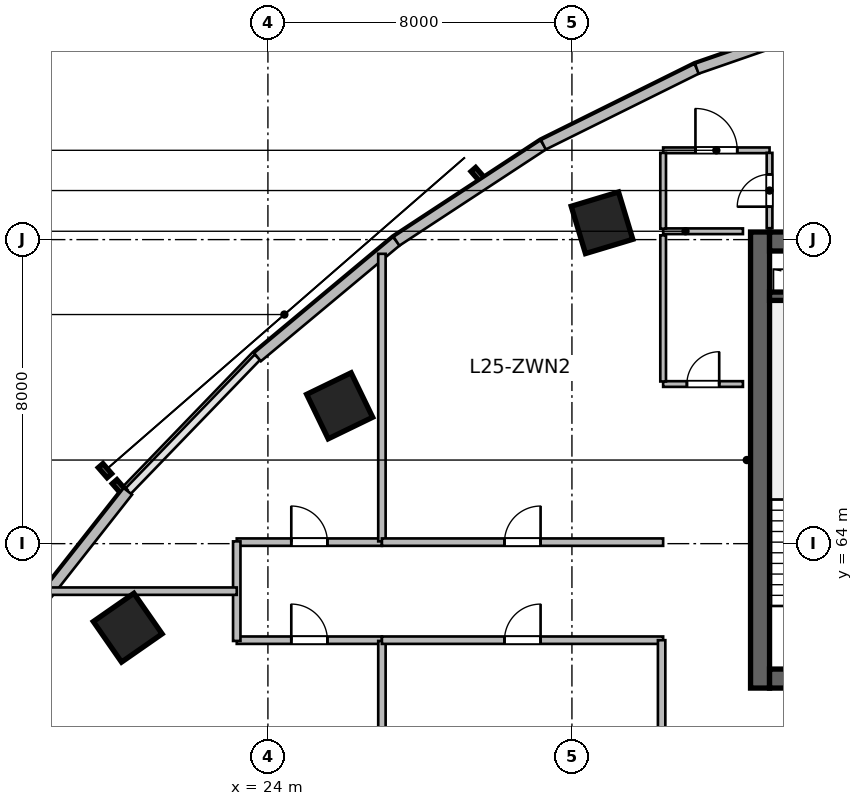
"""IFC4 building model, lengths in metres.
Left out: names, types, materials, properties, quantities, classifications, styles, units other than length and angle.
Written with IfcOpenShell. Run it as: python <this file> out.ifc"""

import sys

from ifc_helpers import new_model, si_unit, direction, frame, frame_2d, origin, origin_2d, place, context, subcontext, project, spatial, rectangle, extrude, source, transform, mapped, element, fill, save


model = new_model("IFC4")
c1 = context("Model", 3, precision=1e-05, world=origin(), true_north=direction((0.0, 1.0)))
c2 = subcontext(c1, "Body", "Model", "MODEL_VIEW")
j1 = project(units=[si_unit("LENGTHUNIT", "METRE"), si_unit("PLANEANGLEUNIT", "RADIAN")], contexts=[c1])
p1 = place(None, origin())
s1 = spatial("IfcSite", under=j1, at=p1, CompositionType="ELEMENT")
p2 = place(p1, origin())
s2 = spatial("IfcBuilding", under=s1, at=p2, CompositionType="ELEMENT")
p3 = place(p2, frame((0.0, 0.0, 107.7)))
s3 = spatial("IfcBuildingStorey", under=s2, at=p3, CompositionType="ELEMENT", Elevation=107.7)
m1 = source(origin(), c2, "Body", "SweptSolid", [
    extrude(rectangle(XDim=12.0, YDim=0.5, at=frame_2d((6.0, 0.0))), origin(), (0.0, 0.0, 1.0), 3.9),
])
p4 = place(p3, frame((36.95, 60.2, 0.0), z_axis=(0.0, 0.0, 1.0), x_axis=(0.0, 1.0, 0.0)))
e1 = element("IfcWall", 1, at=p4, inside=s3, PredefinedType="SHEAR", context=c2, shape_type="MappedRepresentation", body=[
    mapped(m1, transform((0.0, 0.0, 0.0), scale=1.0)),
])
m2 = source(origin(), c2, "Body", "SweptSolid", [
    extrude(rectangle(XDim=21.6, YDim=0.5, at=frame_2d((10.8, 0.0))), origin(), (0.0, 0.0, 1.0), 3.9),
])
p5 = place(p3, frame((37.2, 60.45, 0.0), z_axis=(0.0, 0.0, 1.0), x_axis=(1.0, 0.0, 0.0)))
e2 = element("IfcWall", 2, at=p5, inside=s3, PredefinedType="SHEAR", context=c2, shape_type="MappedRepresentation", body=[
    mapped(m2, transform((0.0, 0.0, 0.0), scale=1.0)),
])
p6 = place(p5, frame((1.1, 0.0, 0.0)))
e3 = element("IfcOpeningElement", 3, at=p6, cuts=e2, PredefinedType="OPENING", context=c2, shape_type="SweptSolid", body=[
    extrude(rectangle(XDim=1.15, YDim=2.15, at=frame_2d((0.575, 1.075))), frame((0.0, 0.26, 0.0), z_axis=(0.0, -1.0, 0.0), x_axis=(1.0, 0.0, 0.0)), (0.0, 0.0, 1.0), 0.52),
])
p7 = place(p5, frame((19.5, 0.0, 0.0)))
e4 = element("IfcOpeningElement", 4, at=p7, cuts=e2, PredefinedType="OPENING", context=c2, shape_type="SweptSolid", body=[
    extrude(rectangle(XDim=0.9, YDim=2.1, at=frame_2d((0.45, 1.05))), frame((0.0, 0.26, 0.0), z_axis=(0.0, -1.0, 0.0), x_axis=(1.0, 0.0, 0.0)), (0.0, 0.0, 1.0), 0.52),
])
p8 = place(p5, frame((12.02, 0.0, 0.0)))
e5 = element("IfcOpeningElement", 5, at=p8, cuts=e2, PredefinedType="OPENING", context=c2, shape_type="SweptSolid", body=[
    extrude(rectangle(XDim=1.6, YDim=2.15, at=frame_2d((0.8, 1.075))), frame((0.0, 0.26, 0.0), z_axis=(0.0, -1.0, 0.0), x_axis=(1.0, 0.0, 0.0)), (0.0, 0.0, 1.0), 0.52),
])
p9 = place(p3, frame((37.2, 71.95, 0.0), z_axis=(0.0, 0.0, 1.0), x_axis=(1.0, 0.0, 0.0)))
e6 = element("IfcWall", 6, at=p9, inside=s3, PredefinedType="SHEAR", context=c2, shape_type="MappedRepresentation", body=[
    mapped(m2, transform((0.0, 0.0, 0.0), scale=1.0)),
])
p10 = place(p9, frame((1.2, 0.0, 0.0)))
e7 = element("IfcOpeningElement", 7, at=p10, cuts=e6, PredefinedType="OPENING", context=c2, shape_type="SweptSolid", body=[
    extrude(rectangle(XDim=0.9, YDim=2.1, at=frame_2d((0.45, 1.05))), frame((0.0, 0.26, 0.0), z_axis=(0.0, -1.0, 0.0), x_axis=(1.0, 0.0, 0.0)), (0.0, 0.0, 1.0), 0.52),
])
p11 = place(p9, frame((14.7, 0.0, 0.0)))
e8 = element("IfcOpeningElement", 8, at=p11, cuts=e6, PredefinedType="OPENING", context=c2, shape_type="SweptSolid", body=[
    extrude(rectangle(XDim=1.2, YDim=2.15, at=frame_2d((0.6, 1.075))), frame((0.0, 0.26, 0.0), z_axis=(0.0, -1.0, 0.0), x_axis=(1.0, 0.0, 0.0)), (0.0, 0.0, 1.0), 0.52),
])
p12 = place(p9, frame((4.15, 0.0, 0.0)))
e9 = element("IfcOpeningElement", 9, at=p12, cuts=e6, PredefinedType="OPENING", context=c2, shape_type="SweptSolid", body=[
    extrude(rectangle(XDim=1.3, YDim=2.15, at=frame_2d((0.65, 1.075))), frame((0.0, 0.26, 0.0), z_axis=(0.0, -1.0, 0.0), x_axis=(1.0, 0.0, 0.0)), (0.0, 0.0, 1.0), 0.52),
])
p13 = place(p9, frame((7.25, 0.0, 0.0)))
e10 = element("IfcOpeningElement", 10, at=p13, cuts=e6, PredefinedType="OPENING", context=c2, shape_type="SweptSolid", body=[
    extrude(rectangle(XDim=0.9, YDim=2.1, at=frame_2d((0.45, 1.05))), frame((0.0, 0.26, 0.0), z_axis=(0.0, -1.0, 0.0), x_axis=(1.0, 0.0, 0.0)), (0.0, 0.0, 1.0), 0.52),
])
p14 = place(p9, frame((10.95, 0.0, 0.0)))
e11 = element("IfcOpeningElement", 11, at=p14, cuts=e6, PredefinedType="OPENING", context=c2, shape_type="SweptSolid", body=[
    extrude(rectangle(XDim=0.9, YDim=2.1, at=frame_2d((0.45, 1.05))), frame((0.0, 0.26, 0.0), z_axis=(0.0, -1.0, 0.0), x_axis=(1.0, 0.0, 0.0)), (0.0, 0.0, 1.0), 0.52),
])
m3 = source(origin(), c2, "Body", "SweptSolid", [
    extrude(rectangle(XDim=3.27, YDim=0.22, at=frame_2d((1.635, 0.0))), origin(), (0.0, 0.0, 1.0), 3.9),
])
p15 = place(p3, frame((37.2, 70.51, 0.0), z_axis=(0.0, 0.0, 1.0), x_axis=(1.0, 0.0, 0.0)))
e12 = element("IfcWall", 12, at=p15, inside=s3, PredefinedType="SHEAR", context=c2, shape_type="MappedRepresentation", body=[
    mapped(m3, transform((0.0, 0.0, 0.0), scale=1.0)),
])
m4 = source(origin(), c2, "Body", "SweptSolid", [
    extrude(rectangle(XDim=1.3, YDim=1.3, at=origin_2d()), origin(), (0.0, 0.0, 1.0), 3.9),
])
for number, where, z_axis, x_axis in (
    (13, (20.311, 61.789, 0.0), (0.0, 0.0, 1.0), (-0.571, 0.821, 0.0)),
    (14, (25.888, 67.627, 0.0), (0.0, 0.0, 1.0), (-0.436, 0.9, 0.0)),
    (15, (32.791, 72.442, 0.0), (0.0, 0.0, 1.0), (-0.289, 0.957, 0.0)),
):
    element("IfcColumn", number, at=place(p3, frame(where, z_axis=z_axis, x_axis=x_axis)), inside=s3, PredefinedType="COLUMN", context=c2, shape_type="MappedRepresentation", body=[
        mapped(m4, transform((0.0, 0.0, 0.0), scale=1.0)),
    ])
m5 = source(origin(), c2, "Body", "SweptSolid", [
    extrude(rectangle(XDim=5.058, YDim=0.28, at=frame_2d((2.529, 0.0))), origin(), (0.0, 0.0, 1.0), 3.65),
])
p16 = place(p3, frame((17.188, 61.4, 0.0), z_axis=(0.0, 0.0, 1.0), x_axis=(0.618145507434, 0.786063694391, 0.0)))
e16 = element("IfcWall", 16, at=p16, inside=s3, PredefinedType="SOLIDWALL", context=c2, shape_type="MappedRepresentation", body=[
    mapped(m5, transform((0.0, 0.0, 0.0), scale=1.0)),
])
m6 = source(origin(), c2, "Body", "SweptSolid", [
    extrude(rectangle(XDim=4.762, YDim=0.28, at=frame_2d((2.381, 0.0))), origin(), (0.0, 0.0, 1.0), 3.65),
])
p17 = place(p3, frame((23.725, 68.907, 0.0), z_axis=(0.0, 0.0, 1.0), x_axis=(0.767952279762, 0.640507061638, 0.0)))
e17 = element("IfcWall", 17, at=p17, inside=s3, PredefinedType="SOLIDWALL", context=c2, shape_type="MappedRepresentation", body=[
    mapped(m6, transform((0.0, 0.0, 0.0), scale=1.0)),
])
m7 = source(origin(), c2, "Body", "SweptSolid", [
    extrude(rectangle(XDim=4.626, YDim=0.28, at=frame_2d((2.313, 0.0))), origin(), (0.0, 0.0, 1.0), 3.65),
])
p18 = place(p3, frame((27.382, 71.958, 0.0), z_axis=(0.0, 0.0, 1.0), x_axis=(0.83595938331, 0.548791316855, 0.0)))
e18 = element("IfcWall", 18, at=p18, inside=s3, PredefinedType="SOLIDWALL", context=c2, shape_type="MappedRepresentation", body=[
    mapped(m7, transform((0.0, 0.0, 0.0), scale=1.0)),
])
m8 = source(origin(), c2, "Body", "SweptSolid", [
    extrude(rectangle(XDim=4.506, YDim=0.28, at=frame_2d((2.253, 0.0))), origin(), (0.0, 0.0, 1.0), 3.65),
])
p19 = place(p3, frame((31.249, 74.496, 0.0), z_axis=(0.0, 0.0, 1.0), x_axis=(0.89597155075, 0.444111450254, 0.0)))
e19 = element("IfcWall", 19, at=p19, inside=s3, PredefinedType="SOLIDWALL", context=c2, shape_type="MappedRepresentation", body=[
    mapped(m8, transform((0.0, 0.0, 0.0), scale=1.0)),
])
m9 = source(origin(), c2, "Body", "SweptSolid", [
    extrude(rectangle(XDim=4.409, YDim=0.28, at=frame_2d((2.205, 0.0))), origin(), (0.0, 0.0, 1.0), 3.65),
])
p20 = place(p3, frame((35.286, 76.497, 0.0), z_axis=(0.0, 0.0, 1.0), x_axis=(0.944879374121, 0.327418643881, 0.0)))
e20 = element("IfcWall", 20, at=p20, inside=s3, PredefinedType="SOLIDWALL", context=c2, shape_type="MappedRepresentation", body=[
    mapped(m9, transform((0.0, 0.0, 0.0), scale=1.0)),
])
m10 = source(origin(), c2, "Body", "SweptSolid", [
    extrude(rectangle(XDim=2.1, YDim=0.15, at=frame_2d((1.05, 0.0))), origin(), (0.0, 0.0, 1.0), 3.65),
])
p21 = place(p3, frame((34.4, 72.22, 0.0), z_axis=(0.0, 0.0, 1.0), x_axis=(1.0, 0.0, 0.0)))
e21 = element("IfcWall", 21, at=p21, inside=s3, PredefinedType="PARTITIONING", context=c2, shape_type="MappedRepresentation", body=[
    mapped(m10, transform((0.0, 0.0, 0.0), scale=1.0)),
])
m11 = source(origin(), c2, "Body", "SweptSolid", [
    extrude(rectangle(XDim=2.8, YDim=0.15, at=frame_2d((1.4, 0.0))), origin(), (0.0, 0.0, 1.0), 3.65),
])
p22 = place(p3, frame((34.4, 74.35, 0.0), z_axis=(0.0, 0.0, 1.0), x_axis=(1.0, 0.0, 0.0)))
e22 = element("IfcWall", 22, at=p22, inside=s3, PredefinedType="PARTITIONING", context=c2, shape_type="MappedRepresentation", body=[
    mapped(m11, transform((0.0, 0.0, 0.0), scale=1.0)),
])
p23 = place(p22, frame((0.85, 0.0, 0.0)))
e23 = element("IfcOpeningElement", 23, at=p23, cuts=e22, PredefinedType="OPENING", context=c2, shape_type="SweptSolid", body=[
    extrude(rectangle(XDim=1.1, YDim=2.15, at=frame_2d((0.55, 1.075))), frame((0.0, 0.085, 0.0), z_axis=(0.0, -1.0, 0.0), x_axis=(1.0, 0.0, 0.0)), (0.0, 0.0, 1.0), 0.17),
])
m12 = source(origin(), c2, "Body", "SweptSolid", [
    extrude(rectangle(XDim=1.995, YDim=0.15, at=frame_2d((0.998, 0.0))), origin(), (0.0, 0.0, 1.0), 3.65),
])
p24 = place(p3, frame((34.4, 72.288, 0.0), z_axis=(0.0, 0.0, 1.0), x_axis=(0.0, 1.0, 0.0)))
e24 = element("IfcWall", 24, at=p24, inside=s3, PredefinedType="PARTITIONING", context=c2, shape_type="MappedRepresentation", body=[
    mapped(m12, transform((0.0, 0.0, 0.0), scale=1.0)),
])
m13 = source(origin(), c2, "Body", "SweptSolid", [
    extrude(rectangle(XDim=1.982, YDim=0.15, at=frame_2d((0.991, 0.0))), origin(), (0.0, 0.0, 1.0), 3.65),
])
p25 = place(p3, frame((37.2, 72.3, 0.0), z_axis=(0.0, 0.0, 1.0), x_axis=(0.0, 1.0, 0.0)))
e25 = element("IfcWall", 25, at=p25, inside=s3, PredefinedType="PARTITIONING", context=c2, shape_type="MappedRepresentation", body=[
    mapped(m13, transform((0.0, 0.0, 0.0), scale=1.0)),
])
p26 = place(p25, frame((0.566, 0.0, 0.0)))
e26 = element("IfcOpeningElement", 26, at=p26, cuts=e25, PredefinedType="OPENING", context=c2, shape_type="SweptSolid", body=[
    extrude(rectangle(XDim=0.85, YDim=2.1, at=frame_2d((0.425, 1.05))), frame((0.0, 0.085, 0.0), z_axis=(0.0, -1.0, 0.0), x_axis=(1.0, 0.0, 0.0)), (0.0, 0.0, 1.0), 0.17),
])
p27 = place(p3, frame((34.4, 68.2, 0.0), z_axis=(0.0, 0.0, 1.0), x_axis=(1.0, 0.0, 0.0)))
e27 = element("IfcWall", 27, at=p27, inside=s3, PredefinedType="PARTITIONING", context=c2, shape_type="MappedRepresentation", body=[
    mapped(m10, transform((0.0, 0.0, 0.0), scale=1.0)),
])
p28 = place(p27, frame((0.625, 0.0, 0.0)))
e28 = element("IfcOpeningElement", 28, at=p28, cuts=e27, PredefinedType="OPENING", context=c2, shape_type="SweptSolid", body=[
    extrude(rectangle(XDim=0.85, YDim=2.1, at=frame_2d((0.425, 1.05))), frame((0.0, 0.085, 0.0), z_axis=(0.0, -1.0, 0.0), x_axis=(1.0, 0.0, 0.0)), (0.0, 0.0, 1.0), 0.17),
])
m14 = source(origin(), c2, "Body", "SweptSolid", [
    extrude(rectangle(XDim=3.845, YDim=0.15, at=frame_2d((1.922, 0.0))), origin(), (0.0, 0.0, 1.0), 3.65),
])
p29 = place(p3, frame((34.4, 68.268, 0.0), z_axis=(0.0, 0.0, 1.0), x_axis=(0.0, 1.0, 0.0)))
e29 = element("IfcWall", 29, at=p29, inside=s3, PredefinedType="PARTITIONING", context=c2, shape_type="MappedRepresentation", body=[
    mapped(m14, transform((0.0, 0.0, 0.0), scale=1.0)),
])
m15 = source(origin(), c2, "Body", "SweptSolid", [
    extrude(rectangle(XDim=3.82, YDim=0.195, at=frame_2d((1.91, 0.0))), origin(), (0.0, 0.0, 1.0), 3.65),
])
p30 = place(p3, frame((23.18, 64.04, 0.0), z_axis=(0.0, 0.0, 1.0), x_axis=(1.0, 0.0, 0.0)))
e30 = element("IfcWall", 30, at=p30, inside=s3, PredefinedType="PARTITIONING", context=c2, shape_type="MappedRepresentation", body=[
    mapped(m15, transform((0.0, 0.0, 0.0), scale=1.0)),
])
p31 = place(p30, frame((1.435, 0.0, 0.0)))
e31 = element("IfcOpeningElement", 31, at=p31, cuts=e30, PredefinedType="OPENING", context=c2, shape_type="SweptSolid", body=[
    extrude(rectangle(XDim=0.95, YDim=2.1, at=frame_2d((0.475, 1.05))), frame((0.0, 0.107, 0.0), z_axis=(0.0, -1.0, 0.0), x_axis=(1.0, 0.0, 0.0)), (0.0, 0.0, 1.0), 0.215),
])
m16 = source(origin(), c2, "Body", "SweptSolid", [
    extrude(rectangle(XDim=7.566, YDim=0.195, at=frame_2d((3.783, 0.0))), origin(), (0.0, 0.0, 1.0), 2.942),
])
p32 = place(p3, frame((27.0, 64.06, 0.0), z_axis=(0.0, 0.0, 1.0), x_axis=(0.0, 1.0, 0.0)))
e32 = element("IfcWall", 32, at=p32, inside=s3, PredefinedType="PARTITIONING", context=c2, shape_type="MappedRepresentation", body=[
    mapped(m16, transform((0.0, 0.0, 0.0), scale=1.0)),
])
m17 = source(origin(), c2, "Body", "SweptSolid", [
    extrude(rectangle(XDim=7.4, YDim=0.195, at=frame_2d((3.7, 0.0))), origin(), (0.0, 0.0, 1.0), 3.65),
])
p33 = place(p3, frame((27.0, 64.04, 0.0), z_axis=(0.0, 0.0, 1.0), x_axis=(1.0, 0.0, 0.0)))
e33 = element("IfcWall", 33, at=p33, inside=s3, PredefinedType="PARTITIONING", context=c2, shape_type="MappedRepresentation", body=[
    mapped(m17, transform((0.0, 0.0, 0.0), scale=1.0)),
])
p34 = place(p33, frame((3.225, 0.0, 0.0)))
e34 = element("IfcOpeningElement", 34, at=p34, cuts=e33, PredefinedType="OPENING", context=c2, shape_type="SweptSolid", body=[
    extrude(rectangle(XDim=0.95, YDim=2.1, at=frame_2d((0.475, 1.05))), frame((0.0, 0.107, 0.0), z_axis=(0.0, -1.0, 0.0), x_axis=(1.0, 0.0, 0.0)), (0.0, 0.0, 1.0), 0.215),
])
p35 = place(p3, frame((23.18, 61.46, 0.0), z_axis=(0.0, 0.0, 1.0), x_axis=(1.0, 0.0, 0.0)))
e35 = element("IfcWall", 35, at=p35, inside=s3, PredefinedType="PARTITIONING", context=c2, shape_type="MappedRepresentation", body=[
    mapped(m15, transform((0.0, 0.0, 0.0), scale=1.0)),
])
p36 = place(p35, frame((1.435, 0.0, 0.0)))
e36 = element("IfcOpeningElement", 36, at=p36, cuts=e35, PredefinedType="OPENING", context=c2, shape_type="SweptSolid", body=[
    extrude(rectangle(XDim=0.95, YDim=2.1, at=frame_2d((0.475, 1.05))), frame((0.0, 0.107, 0.0), z_axis=(0.0, -1.0, 0.0), x_axis=(1.0, 0.0, 0.0)), (0.0, 0.0, 1.0), 0.215),
])
m18 = source(origin(), c2, "Body", "SweptSolid", [
    extrude(rectangle(XDim=23.771, YDim=0.195, at=frame_2d((11.886, 0.0))), origin(), (0.0, 0.0, 1.0), 2.942),
])
p37 = place(p3, frame((27.0, 37.668, 0.0), z_axis=(0.0, 0.0, 1.0), x_axis=(0.0, 1.0, 0.0)))
e37 = element("IfcWall", 37, at=p37, inside=s3, PredefinedType="PARTITIONING", context=c2, shape_type="MappedRepresentation", body=[
    mapped(m18, transform((0.0, 0.0, 0.0), scale=1.0)),
])
p38 = place(p3, frame((27.0, 61.46, 0.0), z_axis=(0.0, 0.0, 1.0), x_axis=(1.0, 0.0, 0.0)))
e38 = element("IfcWall", 38, at=p38, inside=s3, PredefinedType="PARTITIONING", context=c2, shape_type="MappedRepresentation", body=[
    mapped(m17, transform((0.0, 0.0, 0.0), scale=1.0)),
])
p39 = place(p38, frame((3.225, 0.0, 0.0)))
e39 = element("IfcOpeningElement", 39, at=p39, cuts=e38, PredefinedType="OPENING", context=c2, shape_type="SweptSolid", body=[
    extrude(rectangle(XDim=0.95, YDim=2.1, at=frame_2d((0.475, 1.05))), frame((0.0, 0.107, 0.0), z_axis=(0.0, -1.0, 0.0), x_axis=(1.0, 0.0, 0.0)), (0.0, 0.0, 1.0), 0.215),
])
m19 = source(origin(), c2, "Body", "SweptSolid", [
    extrude(rectangle(XDim=13.988, YDim=0.195, at=frame_2d((6.994, 0.0))), origin(), (0.0, 0.0, 1.0), 3.65),
])
p40 = place(p3, frame((34.36, 47.472, 0.0), z_axis=(0.0, 0.0, 1.0), x_axis=(0.0, 1.0, 0.0)))
e40 = element("IfcWall", 40, at=p40, inside=s3, PredefinedType="PARTITIONING", context=c2, shape_type="MappedRepresentation", body=[
    mapped(m19, transform((0.0, 0.0, 0.0), scale=1.0)),
])
m20 = source(origin(), c2, "Body", "SweptSolid", [
    extrude(rectangle(XDim=2.62, YDim=0.195, at=frame_2d((1.31, 0.0))), origin(), (0.0, 0.0, 1.0), 3.65),
])
p41 = place(p3, frame((23.18, 61.44, 0.0), z_axis=(0.0, 0.0, 1.0), x_axis=(0.0, 1.0, 0.0)))
e41 = element("IfcWall", 41, at=p41, inside=s3, PredefinedType="PARTITIONING", context=c2, shape_type="MappedRepresentation", body=[
    mapped(m20, transform((0.0, 0.0, 0.0), scale=1.0)),
])
m21 = source(origin(), c2, "Body", "SweptSolid", [
    extrude(rectangle(XDim=4.917, YDim=0.195, at=frame_2d((2.459, 0.0))), origin(), (0.0, 0.0, 1.0), 3.65),
])
p42 = place(p3, frame((18.262, 62.75, 0.0), z_axis=(0.0, 0.0, 1.0), x_axis=(1.0, 0.0, 0.0)))
e42 = element("IfcWall", 42, at=p42, inside=s3, PredefinedType="PARTITIONING", context=c2, shape_type="MappedRepresentation", body=[
    mapped(m21, transform((0.0, 0.0, 0.0), scale=1.0)),
])
m22 = source(origin(), c2, "Body", "SweptSolid", [
    extrude(rectangle(XDim=0.85, YDim=2.1, at=frame_2d((0.425, 1.05))), frame((0.0, 0.025, 0.0), z_axis=(0.0, -1.0, 0.0), x_axis=(1.0, 0.0, 0.0)), (0.0, 0.0, 1.0), 0.05),
])
p43 = place(p26, origin())
e43 = element("IfcDoor", 43, at=p43, inside=s3, OperationType="SINGLE_SWING_LEFT", PredefinedType="DOOR", context=c2, shape_type="MappedRepresentation", body=[
    mapped(m22, transform((0.0, 0.0, 0.0), scale=1.0)),
])
fill(e26, e43)
p44 = place(p28, origin())
e44 = element("IfcDoor", 44, at=p44, inside=s3, OperationType="SINGLE_SWING_RIGHT", PredefinedType="DOOR", context=c2, shape_type="MappedRepresentation", body=[
    mapped(m22, transform((0.0, 0.0, 0.0), scale=1.0)),
])
fill(e28, e44)
m23 = source(origin(), c2, "Body", "SweptSolid", [
    extrude(rectangle(XDim=1.1, YDim=2.15, at=frame_2d((0.55, 1.075))), frame((0.0, 0.025, 0.0), z_axis=(0.0, -1.0, 0.0), x_axis=(1.0, 0.0, 0.0)), (0.0, 0.0, 1.0), 0.05),
])
p45 = place(p23, origin())
e45 = element("IfcDoor", 45, at=p45, inside=s3, OperationType="SINGLE_SWING_LEFT", PredefinedType="DOOR", context=c2, shape_type="MappedRepresentation", body=[
    mapped(m23, transform((0.0, 0.0, 0.0), scale=1.0)),
])
fill(e23, e45)
m24 = source(origin(), c2, "Body", "SweptSolid", [
    extrude(rectangle(XDim=0.95, YDim=2.1, at=frame_2d((0.475, 1.05))), frame((0.0, 0.025, 0.0), z_axis=(0.0, -1.0, 0.0), x_axis=(1.0, 0.0, 0.0)), (0.0, 0.0, 1.0), 0.05),
])
p46 = place(p31, origin())
e46 = element("IfcDoor", 46, at=p46, inside=s3, OperationType="SINGLE_SWING_LEFT", PredefinedType="DOOR", context=c2, shape_type="MappedRepresentation", body=[
    mapped(m24, transform((0.0, 0.0, 0.0), scale=1.0)),
])
fill(e31, e46)
p47 = place(p34, origin())
e47 = element("IfcDoor", 47, at=p47, inside=s3, OperationType="SINGLE_SWING_RIGHT", PredefinedType="DOOR", context=c2, shape_type="MappedRepresentation", body=[
    mapped(m24, transform((0.0, 0.0, 0.0), scale=1.0)),
])
fill(e34, e47)
p48 = place(p36, origin())
e48 = element("IfcDoor", 48, at=p48, inside=s3, OperationType="SINGLE_SWING_LEFT", PredefinedType="DOOR", context=c2, shape_type="MappedRepresentation", body=[
    mapped(m24, transform((0.0, 0.0, 0.0), scale=1.0)),
])
fill(e36, e48)
p49 = place(p39, origin())
e49 = element("IfcDoor", 49, at=p49, inside=s3, OperationType="SINGLE_SWING_RIGHT", PredefinedType="DOOR", context=c2, shape_type="MappedRepresentation", body=[
    mapped(m24, transform((0.0, 0.0, 0.0), scale=1.0)),
])
fill(e39, e49)
save(model, sys.argv[1])
